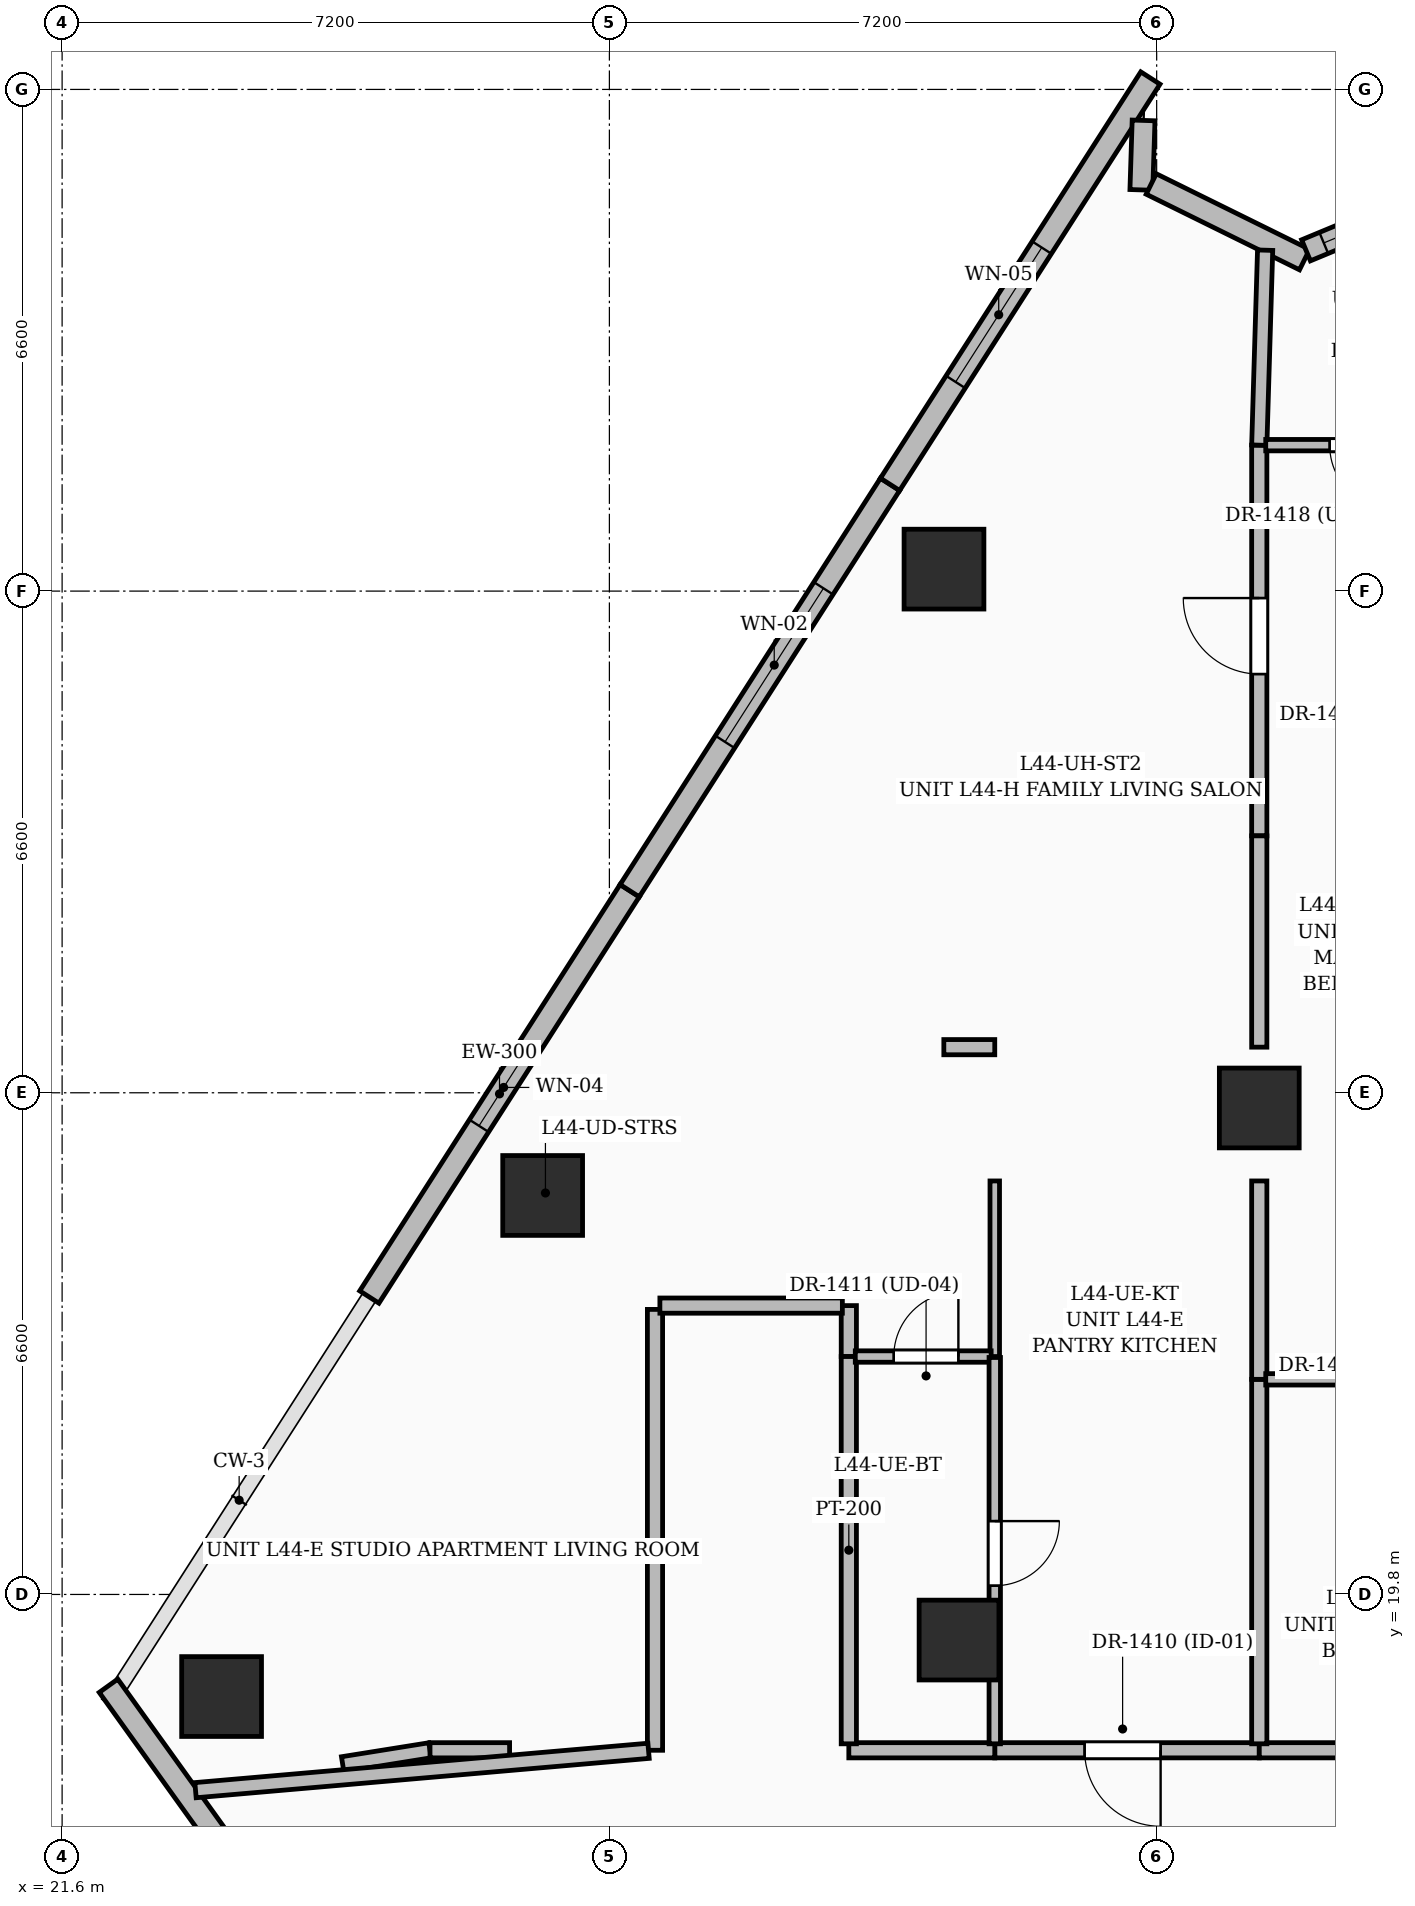
"""IFC4 building model, lengths in metres.
Left out: names, types, materials, properties, quantities, classifications, styles, units other than length and angle.
Written with IfcOpenShell. Run it as: python <this file> out.ifc"""

import sys

from ifc_helpers import new_model, si_unit, direction, frame, frame_2d, origin, origin_2d, place, context, subcontext, project, spatial, rectangle, extrude, element, fill, save


model = new_model("IFC4")
c1 = context("Model", 3, precision=1e-05, world=origin(), true_north=direction((0.0, 1.0)))
c2 = subcontext(c1, "Body", "Model", "MODEL_VIEW")
j1 = project(units=[si_unit("LENGTHUNIT", "METRE"), si_unit("PLANEANGLEUNIT", "RADIAN")], contexts=[c1])
p1 = place(None, origin())
s1 = spatial("IfcSite", under=j1, at=p1, CompositionType="ELEMENT")
p2 = place(p1, origin())
s2 = spatial("IfcBuilding", under=s1, at=p2, CompositionType="ELEMENT")
p3 = place(p2, frame((0.0, 0.0, 171.6)))
s3 = spatial("IfcBuildingStorey", under=s2, at=p3, CompositionType="ELEMENT", Elevation=171.6)
for number, where, z_axis, x_axis in (
    (1, (37.35, 26.2, 0.0), (0.0, 0.0, 1.0), (1.0, 0.0, 0.0)),
    (2, (33.4, 19.2, 0.0), (0.0, 0.0, 1.0), (1.0, 0.0, 0.0)),
    (3, (33.202, 33.289, 0.0), (0.0, 0.0, 1.0), (1.0, 0.0, 0.0)),
    (4, (27.922, 25.049, 0.0), (0.0, 0.0, 1.0), (1.0, 0.0, 0.0)),
    (5, (23.698, 18.457, 0.0), (0.0, 0.0, 1.0), (1.0, 0.0, 0.0)),
):
    element("IfcColumn", number, at=place(p3, frame(where, z_axis=z_axis, x_axis=x_axis)), inside=s3, PredefinedType="COLUMN", context=c2, shape_type="SweptSolid", body=[
        extrude(rectangle(XDim=1.05, YDim=1.05, at=origin_2d()), origin(), (0.0, 0.0, 1.0), 3.6),
    ])
p4 = place(p3, frame((23.723, 16.492, 0.0), z_axis=(0.0, 0.0, 1.0), x_axis=(-0.583178108206, 0.812344319922, 0.0)))
e6 = element("IfcWall", 6, at=p4, inside=s3, PredefinedType="SOLIDWALL", context=c2, shape_type="SweptSolid", body=[
    extrude(rectangle(XDim=2.593, YDim=0.3, at=frame_2d((1.296, 0.0))), origin(), (0.0, 0.0, 1.0), 2.575),
])
p5 = place(p3, frame((25.642, 23.713, 0.0), z_axis=(0.0, 0.0, 1.0), x_axis=(0.539505373447, 0.841982156593, 0.0)))
e7 = element("IfcWall", 7, at=p5, inside=s3, PredefinedType="SOLIDWALL", context=c2, shape_type="SweptSolid", body=[
    extrude(rectangle(XDim=6.349, YDim=0.3, at=frame_2d((3.174, 0.0))), origin(), (0.0, 0.0, 1.0), 3.35),
])
p6 = place(p5, frame((2.675, 0.0, 0.8)))
e8 = element("IfcOpeningElement", 8, at=p6, cuts=e7, PredefinedType="OPENING", context=c2, shape_type="SweptSolid", body=[
    extrude(rectangle(XDim=1.2, YDim=1.8, at=frame_2d((0.6, 0.9))), frame((0.0, 0.16, 0.0), z_axis=(0.0, -1.0, 0.0), x_axis=(1.0, 0.0, 0.0)), (0.0, 0.0, 1.0), 0.32),
])
p7 = place(p3, frame((29.067, 29.059, 0.0), z_axis=(0.0, 0.0, 1.0), x_axis=(0.539505373447, 0.841982156593, 0.0)))
e9 = element("IfcWall", 9, at=p7, inside=s3, PredefinedType="SOLIDWALL", context=c2, shape_type="SweptSolid", body=[
    extrude(rectangle(XDim=6.349, YDim=0.3, at=frame_2d((3.174, 0.0))), origin(), (0.0, 0.0, 1.0), 3.35),
])
p8 = place(p7, frame((2.325, 0.0, 0.6)))
e10 = element("IfcOpeningElement", 10, at=p8, cuts=e9, PredefinedType="OPENING", context=c2, shape_type="SweptSolid", body=[
    extrude(rectangle(XDim=2.4, YDim=2.1, at=frame_2d((1.2, 1.05))), frame((0.0, 0.16, 0.0), z_axis=(0.0, -1.0, 0.0), x_axis=(1.0, 0.0, 0.0)), (0.0, 0.0, 1.0), 0.32),
])
p9 = place(p3, frame((32.492, 34.404, 0.0), z_axis=(0.0, 0.0, 1.0), x_axis=(0.539505373447, 0.841982156593, 0.0)))
e11 = element("IfcWall", 11, at=p9, inside=s3, PredefinedType="SOLIDWALL", context=c2, shape_type="SweptSolid", body=[
    extrude(rectangle(XDim=6.349, YDim=0.3, at=frame_2d((3.174, 0.0))), origin(), (0.0, 0.0, 1.0), 3.35),
])
p10 = place(p9, frame((1.6, 0.0, 0.55)))
e12 = element("IfcOpeningElement", 12, at=p10, cuts=e11, PredefinedType="OPENING", context=c2, shape_type="SweptSolid", body=[
    extrude(rectangle(XDim=2.1, YDim=2.4, at=frame_2d((1.05, 1.2))), frame((0.0, 0.16, 0.0), z_axis=(0.0, -1.0, 0.0), x_axis=(1.0, 0.0, 0.0)), (0.0, 0.0, 1.0), 0.32),
])
p11 = place(p3, frame((35.828, 39.192, 0.0), z_axis=(0.0, 0.0, 1.0), x_axis=(-0.032034831829, -0.999486753064, 0.0)))
e13 = element("IfcWall", 13, at=p11, inside=s3, PredefinedType="SOLIDWALL", context=c2, shape_type="SweptSolid", body=[
    extrude(rectangle(XDim=0.915, YDim=0.3, at=frame_2d((0.457, 0.0))), origin(), (0.0, 0.0, 1.0), 3.35),
])
p12 = place(p3, frame((35.928, 38.356, 0.0), z_axis=(0.0, 0.0, 1.0), x_axis=(0.896845505116, -0.442343915922, 0.0)))
e14 = element("IfcWall", 14, at=p12, inside=s3, PredefinedType="SOLIDWALL", context=c2, shape_type="SweptSolid", body=[
    extrude(rectangle(XDim=2.249, YDim=0.3, at=frame_2d((1.125, 0.0))), origin(), (0.0, 0.0, 1.0), 3.35),
])
p13 = place(p3, frame((37.965, 37.483, 0.0), z_axis=(0.0, 0.0, 1.0), x_axis=(0.923525911383, 0.383536036123, 0.0)))
e15 = element("IfcWall", 15, at=p13, inside=s3, PredefinedType="SOLIDWALL", context=c2, shape_type="SweptSolid", body=[
    extrude(rectangle(XDim=2.233, YDim=0.3, at=frame_2d((1.116, 0.0))), origin(), (0.0, 0.0, 1.0), 3.35),
])
p14 = place(p13, frame((0.253, 0.0, 0.8)))
e16 = element("IfcOpeningElement", 16, at=p14, cuts=e15, PredefinedType="OPENING", context=c2, shape_type="SweptSolid", body=[
    extrude(rectangle(XDim=1.2, YDim=1.8, at=frame_2d((0.6, 0.9))), frame((0.0, 0.16, 0.0), z_axis=(0.0, -1.0, 0.0), x_axis=(1.0, 0.0, 0.0)), (0.0, 0.0, 1.0), 0.32),
])
p15 = place(p3, frame((26.44, 17.75, 0.0), z_axis=(0.0, 0.0, 1.0), x_axis=(-0.987406566655, -0.158203262061, 0.0)))
e17 = element("IfcWall", 17, at=p15, inside=s3, PredefinedType="PARTITIONING", context=c2, shape_type="SweptSolid", body=[
    extrude(rectangle(XDim=1.164, YDim=0.2, at=frame_2d((0.582, 0.0))), origin(), (0.0, 0.0, 1.0), 1.12),
])
p16 = place(p3, frame((27.487, 17.75, 0.0), z_axis=(0.0, 0.0, 1.0), x_axis=(-1.0, 0.0, 0.0)))
e18 = element("IfcWall", 18, at=p16, inside=s3, PredefinedType="PARTITIONING", context=c2, shape_type="SweptSolid", body=[
    extrude(rectangle(XDim=1.047, YDim=0.2, at=frame_2d((0.523, 0.0))), origin(), (0.0, 0.0, 1.0), 2.787),
])
p17 = place(p3, frame((31.95, 22.93, 0.0), z_axis=(0.0, 0.0, 1.0), x_axis=(0.0, 1.0, 0.0)))
e19 = element("IfcWall", 19, at=p17, inside=s3, PredefinedType="PARTITIONING", context=c2, shape_type="SweptSolid", body=[
    extrude(rectangle(XDim=0.67, YDim=0.2, at=frame_2d((0.335, 0.0))), origin(), (0.0, 0.0, 1.0), 3.35),
])
p18 = place(p3, frame((37.35, 17.75, 0.0), z_axis=(0.0, 0.0, 1.0), x_axis=(-1.0, 0.0, 0.0)))
e20 = element("IfcWall", 20, at=p18, inside=s3, PredefinedType="PARTITIONING", context=c2, shape_type="SweptSolid", body=[
    extrude(rectangle(XDim=3.48, YDim=0.2, at=frame_2d((1.74, 0.0))), origin(), (0.0, 0.0, 1.0), 2.436),
])
p19 = place(p18, frame((1.298, 0.0, 0.0)))
e21 = element("IfcOpeningElement", 21, at=p19, cuts=e20, PredefinedType="OPENING", context=c2, shape_type="SweptSolid", body=[
    extrude(rectangle(XDim=1.0, YDim=2.2, at=frame_2d((0.5, 1.1))), frame((0.0, 0.11, 0.0), z_axis=(0.0, -1.0, 0.0), x_axis=(1.0, 0.0, 0.0)), (0.0, 0.0, 1.0), 0.22),
])
p20 = place(p3, frame((33.87, 17.75, 0.0), z_axis=(0.0, 0.0, 1.0), x_axis=(-1.0, 0.0, 0.0)))
e22 = element("IfcWall", 22, at=p20, inside=s3, PredefinedType="PARTITIONING", context=c2, shape_type="SweptSolid", body=[
    extrude(rectangle(XDim=1.92, YDim=0.2, at=frame_2d((0.96, 0.0))), origin(), (0.0, 0.0, 1.0), 2.436),
])
p21 = place(p3, frame((31.95, 17.835, 0.0), z_axis=(0.0, 0.0, 1.0), x_axis=(0.0, 1.0, 0.0)))
e23 = element("IfcWall", 23, at=p21, inside=s3, PredefinedType="PARTITIONING", context=c2, shape_type="SweptSolid", body=[
    extrude(rectangle(XDim=5.095, YDim=0.2, at=frame_2d((2.547, 0.0))), origin(), (0.0, 0.0, 1.0), 1.12),
])
p22 = place(p3, frame((41.365, 17.75, 0.0), z_axis=(0.0, 0.0, 1.0), x_axis=(-1.0, 0.0, 0.0)))
e24 = element("IfcWall", 24, at=p22, inside=s3, PredefinedType="PARTITIONING", context=c2, shape_type="SweptSolid", body=[
    extrude(rectangle(XDim=4.015, YDim=0.2, at=frame_2d((2.007, 0.0))), origin(), (0.0, 0.0, 1.0), 3.35),
])
p23 = place(p3, frame((33.87, 22.93, 0.0), z_axis=(0.0, 0.0, 1.0), x_axis=(0.0, 1.0, 0.0)))
e25 = element("IfcWall", 25, at=p23, inside=s3, PredefinedType="PARTITIONING", context=c2, shape_type="SweptSolid", body=[
    extrude(rectangle(XDim=2.31, YDim=0.125, at=frame_2d((1.155, 0.0))), origin(), (0.0, 0.0, 1.0), 2.787),
])
p24 = place(p3, frame((32.035, 22.93, 0.0), z_axis=(0.0, 0.0, 1.0), x_axis=(1.0, 0.0, 0.0)))
e26 = element("IfcWall", 26, at=p24, inside=s3, PredefinedType="PARTITIONING", context=c2, shape_type="SweptSolid", body=[
    extrude(rectangle(XDim=1.788, YDim=0.15, at=frame_2d((0.894, 0.0))), origin(), (0.0, 0.0, 1.0), 2.787),
])
p25 = place(p24, frame((0.506, 0.0, 0.0)))
e27 = element("IfcOpeningElement", 27, at=p25, cuts=e26, PredefinedType="OPENING", context=c2, shape_type="SweptSolid", body=[
    extrude(rectangle(XDim=0.85, YDim=2.1, at=frame_2d((0.425, 1.05))), frame((0.0, 0.085, 0.0), z_axis=(0.0, -1.0, 0.0), x_axis=(1.0, 0.0, 0.0)), (0.0, 0.0, 1.0), 0.17),
])
p26 = place(p3, frame((33.87, 27.0, 0.0), z_axis=(0.0, 0.0, 1.0), x_axis=(-1.0, 0.0, 0.0)))
e28 = element("IfcWall", 28, at=p26, inside=s3, PredefinedType="PARTITIONING", context=c2, shape_type="SweptSolid", body=[
    extrude(rectangle(XDim=0.67, YDim=0.2, at=frame_2d((0.335, 0.0))), origin(), (0.0, 0.0, 1.0), 2.787),
])
p27 = place(p3, frame((33.87, 22.917, 0.0), z_axis=(0.0, 0.0, 1.0), x_axis=(0.0, -1.0, 0.0)))
e29 = element("IfcWall", 29, at=p27, inside=s3, PredefinedType="PARTITIONING", context=c2, shape_type="SweptSolid", body=[
    extrude(rectangle(XDim=5.083, YDim=0.15, at=frame_2d((2.541, 0.0))), origin(), (0.0, 0.0, 1.0), 2.436),
])
p28 = place(p27, frame((2.153, 0.0, 0.0)))
e30 = element("IfcOpeningElement", 30, at=p28, cuts=e29, PredefinedType="OPENING", context=c2, shape_type="SweptSolid", body=[
    extrude(rectangle(XDim=0.85, YDim=2.1, at=frame_2d((0.425, 1.05))), frame((0.0, 0.085, 0.0), z_axis=(0.0, -1.0, 0.0), x_axis=(1.0, 0.0, 0.0)), (0.0, 0.0, 1.0), 0.17),
])
p29 = place(p3, frame((37.35, 17.835, 0.0), z_axis=(0.0, 0.0, 1.0), x_axis=(0.0, 1.0, 0.0)))
e31 = element("IfcWall", 31, at=p29, inside=s3, PredefinedType="PARTITIONING", context=c2, shape_type="SweptSolid", body=[
    extrude(rectangle(XDim=4.795, YDim=0.2, at=frame_2d((2.397, 0.0))), origin(), (0.0, 0.0, 1.0), 3.35),
])
p30 = place(p3, frame((37.35, 22.63, 0.0), z_axis=(0.0, 0.0, 1.0), x_axis=(0.0, 1.0, 0.0)))
e32 = element("IfcWall", 32, at=p30, inside=s3, PredefinedType="PARTITIONING", context=c2, shape_type="SweptSolid", body=[
    extrude(rectangle(XDim=2.61, YDim=0.2, at=frame_2d((1.305, 0.0))), origin(), (0.0, 0.0, 1.0), 3.35),
])
p31 = place(p3, frame((37.35, 29.78, 0.0), z_axis=(0.0, 0.0, 1.0), x_axis=(0.0, 1.0, 0.0)))
e33 = element("IfcWall", 33, at=p31, inside=s3, PredefinedType="PARTITIONING", context=c2, shape_type="SweptSolid", body=[
    extrude(rectangle(XDim=5.14, YDim=0.2, at=frame_2d((2.57, 0.0))), origin(), (0.0, 0.0, 1.0), 2.57),
])
p32 = place(p31, frame((2.128, 0.0, 0.0)))
e34 = element("IfcOpeningElement", 34, at=p32, cuts=e33, PredefinedType="OPENING", context=c2, shape_type="SweptSolid", body=[
    extrude(rectangle(XDim=1.0, YDim=2.2, at=frame_2d((0.5, 1.1))), frame((0.0, 0.11, 0.0), z_axis=(0.0, -1.0, 0.0), x_axis=(1.0, 0.0, 0.0)), (0.0, 0.0, 1.0), 0.22),
])
p33 = place(p3, frame((37.35, 34.92, 0.0), z_axis=(0.0, 0.0, 1.0), x_axis=(0.029966549364, 0.999550902115, 0.0)))
e35 = element("IfcWall", 35, at=p33, inside=s3, PredefinedType="PARTITIONING", context=c2, shape_type="SweptSolid", body=[
    extrude(rectangle(XDim=2.566, YDim=0.2, at=frame_2d((1.283, 0.0))), origin(), (0.0, 0.0, 1.0), 3.35),
])
p34 = place(p3, frame((37.35, 27.0, 0.0), z_axis=(0.0, 0.0, 1.0), x_axis=(0.0, 1.0, 0.0)))
e36 = element("IfcWall", 36, at=p34, inside=s3, PredefinedType="PARTITIONING", context=c2, shape_type="SweptSolid", body=[
    extrude(rectangle(XDim=2.78, YDim=0.2, at=frame_2d((1.39, 0.0))), origin(), (0.0, 0.0, 1.0), 1.12),
])
p35 = place(p3, frame((39.88, 22.63, 0.0), z_axis=(0.0, 0.0, 1.0), x_axis=(-1.0, 0.0, 0.0)))
e37 = element("IfcWall", 37, at=p35, inside=s3, PredefinedType="PARTITIONING", context=c2, shape_type="SweptSolid", body=[
    extrude(rectangle(XDim=2.445, YDim=0.15, at=frame_2d((1.222, 0.0))), origin(), (0.0, 0.0, 1.0), 3.35),
])
p36 = place(p3, frame((39.893, 34.92, 0.0), z_axis=(0.0, 0.0, 1.0), x_axis=(-1.0, 0.0, 0.0)))
e38 = element("IfcWall", 38, at=p36, inside=s3, PredefinedType="PARTITIONING", context=c2, shape_type="SweptSolid", body=[
    extrude(rectangle(XDim=2.458, YDim=0.15, at=frame_2d((1.229, 0.0))), origin(), (0.0, 0.0, 1.0), 3.35),
])
p37 = place(p36, frame((0.766, 0.0, 0.0)))
e39 = element("IfcOpeningElement", 39, at=p37, cuts=e38, PredefinedType="OPENING", context=c2, shape_type="SweptSolid", body=[
    extrude(rectangle(XDim=0.85, YDim=2.1, at=frame_2d((0.425, 1.05))), frame((0.0, 0.085, 0.0), z_axis=(0.0, -1.0, 0.0), x_axis=(1.0, 0.0, 0.0)), (0.0, 0.0, 1.0), 0.17),
])
p38 = place(p3, frame((29.4, 23.55, 0.0), z_axis=(0.0, 0.0, 1.0), x_axis=(0.0, -1.0, 0.0)))
e40 = element("IfcWall", 40, at=p38, inside=s3, PredefinedType="PARTITIONING", context=c2, shape_type="SweptSolid", body=[
    extrude(rectangle(XDim=5.8, YDim=0.2, at=frame_2d((2.9, 0.0))), origin(), (0.0, 0.0, 1.0), 1.12),
])
p39 = place(p3, frame((29.315, 17.743, 0.0), z_axis=(0.0, 0.0, 1.0), x_axis=(-0.996247169733, -0.086553895343, 0.0)))
e41 = element("IfcWall", 41, at=p39, inside=s3, PredefinedType="PARTITIONING", context=c2, shape_type="SweptSolid", body=[
    extrude(rectangle(XDim=5.983, YDim=0.2, at=frame_2d((2.991, 0.0))), origin(), (0.0, 0.0, 1.0), 1.12),
])
p40 = place(p3, frame((31.865, 23.6, 0.0), z_axis=(0.0, 0.0, 1.0), x_axis=(-1.0, 0.0, 0.0)))
e42 = element("IfcWall", 42, at=p40, inside=s3, PredefinedType="PARTITIONING", context=c2, shape_type="SweptSolid", body=[
    extrude(rectangle(XDim=2.401, YDim=0.2, at=frame_2d((1.2, 0.0))), origin(), (0.0, 0.0, 1.0), 1.12),
])
p41 = place(p6, origin())
e43 = element("IfcWindow", 43, at=p41, inside=s3, PartitioningType="SINGLE_PANEL", PredefinedType="WINDOW", context=c2, shape_type="SweptSolid", body=[
    extrude(rectangle(XDim=1.2, YDim=1.8, at=frame_2d((0.6, 0.9))), frame((0.0, 0.03, 0.0), z_axis=(0.0, -1.0, 0.0), x_axis=(1.0, 0.0, 0.0)), (0.0, 0.0, 1.0), 0.06),
])
fill(e8, e43)
p42 = place(p8, origin())
e44 = element("IfcWindow", 44, at=p42, inside=s3, PartitioningType="SINGLE_PANEL", PredefinedType="WINDOW", context=c2, shape_type="SweptSolid", body=[
    extrude(rectangle(XDim=2.4, YDim=2.1, at=frame_2d((1.2, 1.05))), frame((0.0, 0.03, 0.0), z_axis=(0.0, -1.0, 0.0), x_axis=(1.0, 0.0, 0.0)), (0.0, 0.0, 1.0), 0.06),
])
fill(e10, e44)
p43 = place(p10, origin())
e45 = element("IfcWindow", 45, at=p43, inside=s3, PartitioningType="SINGLE_PANEL", PredefinedType="WINDOW", context=c2, shape_type="SweptSolid", body=[
    extrude(rectangle(XDim=2.1, YDim=2.4, at=frame_2d((1.05, 1.2))), frame((0.0, 0.03, 0.0), z_axis=(0.0, -1.0, 0.0), x_axis=(1.0, 0.0, 0.0)), (0.0, 0.0, 1.0), 0.06),
])
fill(e12, e45)
p44 = place(p14, origin())
e46 = element("IfcWindow", 46, at=p44, inside=s3, PartitioningType="SINGLE_PANEL", PredefinedType="WINDOW", context=c2, shape_type="SweptSolid", body=[
    extrude(rectangle(XDim=1.2, YDim=1.8, at=frame_2d((0.6, 0.9))), frame((0.0, 0.03, 0.0), z_axis=(0.0, -1.0, 0.0), x_axis=(1.0, 0.0, 0.0)), (0.0, 0.0, 1.0), 0.06),
])
fill(e16, e46)
p45 = place(p19, origin())
e47 = element("IfcDoor", 47, at=p45, inside=s3, OperationType="SINGLE_SWING_LEFT", PredefinedType="DOOR", context=c2, shape_type="SweptSolid", body=[
    extrude(rectangle(XDim=1.0, YDim=2.2, at=frame_2d((0.5, 1.1))), frame((0.0, 0.025, 0.0), z_axis=(0.0, -1.0, 0.0), x_axis=(1.0, 0.0, 0.0)), (0.0, 0.0, 1.0), 0.05),
])
fill(e21, e47)
p46 = place(p25, origin())
e48 = element("IfcDoor", 48, at=p46, inside=s3, OperationType="SINGLE_SWING_RIGHT", PredefinedType="DOOR", context=c2, shape_type="SweptSolid", body=[
    extrude(rectangle(XDim=0.85, YDim=2.1, at=frame_2d((0.425, 1.05))), frame((0.0, 0.025, 0.0), z_axis=(0.0, -1.0, 0.0), x_axis=(1.0, 0.0, 0.0)), (0.0, 0.0, 1.0), 0.05),
])
fill(e27, e48)
p47 = place(p37, origin())
e49 = element("IfcDoor", 49, at=p47, inside=s3, OperationType="SINGLE_SWING_LEFT", PredefinedType="DOOR", context=c2, shape_type="SweptSolid", body=[
    extrude(rectangle(XDim=0.85, YDim=2.1, at=frame_2d((0.425, 1.05))), frame((0.0, 0.025, 0.0), z_axis=(0.0, -1.0, 0.0), x_axis=(1.0, 0.0, 0.0)), (0.0, 0.0, 1.0), 0.05),
])
fill(e39, e49)
p48 = place(p32, origin())
e50 = element("IfcDoor", 50, at=p48, inside=s3, OperationType="SINGLE_SWING_RIGHT", PredefinedType="DOOR", context=c2, shape_type="SweptSolid", body=[
    extrude(rectangle(XDim=1.0, YDim=2.2, at=frame_2d((0.5, 1.1))), frame((0.0, 0.025, 0.0), z_axis=(0.0, -1.0, 0.0), x_axis=(1.0, 0.0, 0.0)), (0.0, 0.0, 1.0), 0.05),
])
fill(e34, e50)
p49 = place(p28, origin())
e51 = element("IfcDoor", 51, at=p49, inside=s3, OperationType="SINGLE_SWING_LEFT", PredefinedType="DOOR", context=c2, shape_type="SweptSolid", body=[
    extrude(rectangle(XDim=0.85, YDim=2.1, at=frame_2d((0.425, 1.05))), frame((0.0, 0.025, 0.0), z_axis=(0.0, -1.0, 0.0), x_axis=(1.0, 0.0, 0.0)), (0.0, 0.0, 1.0), 0.05),
])
fill(e30, e51)
save(model, sys.argv[1])
